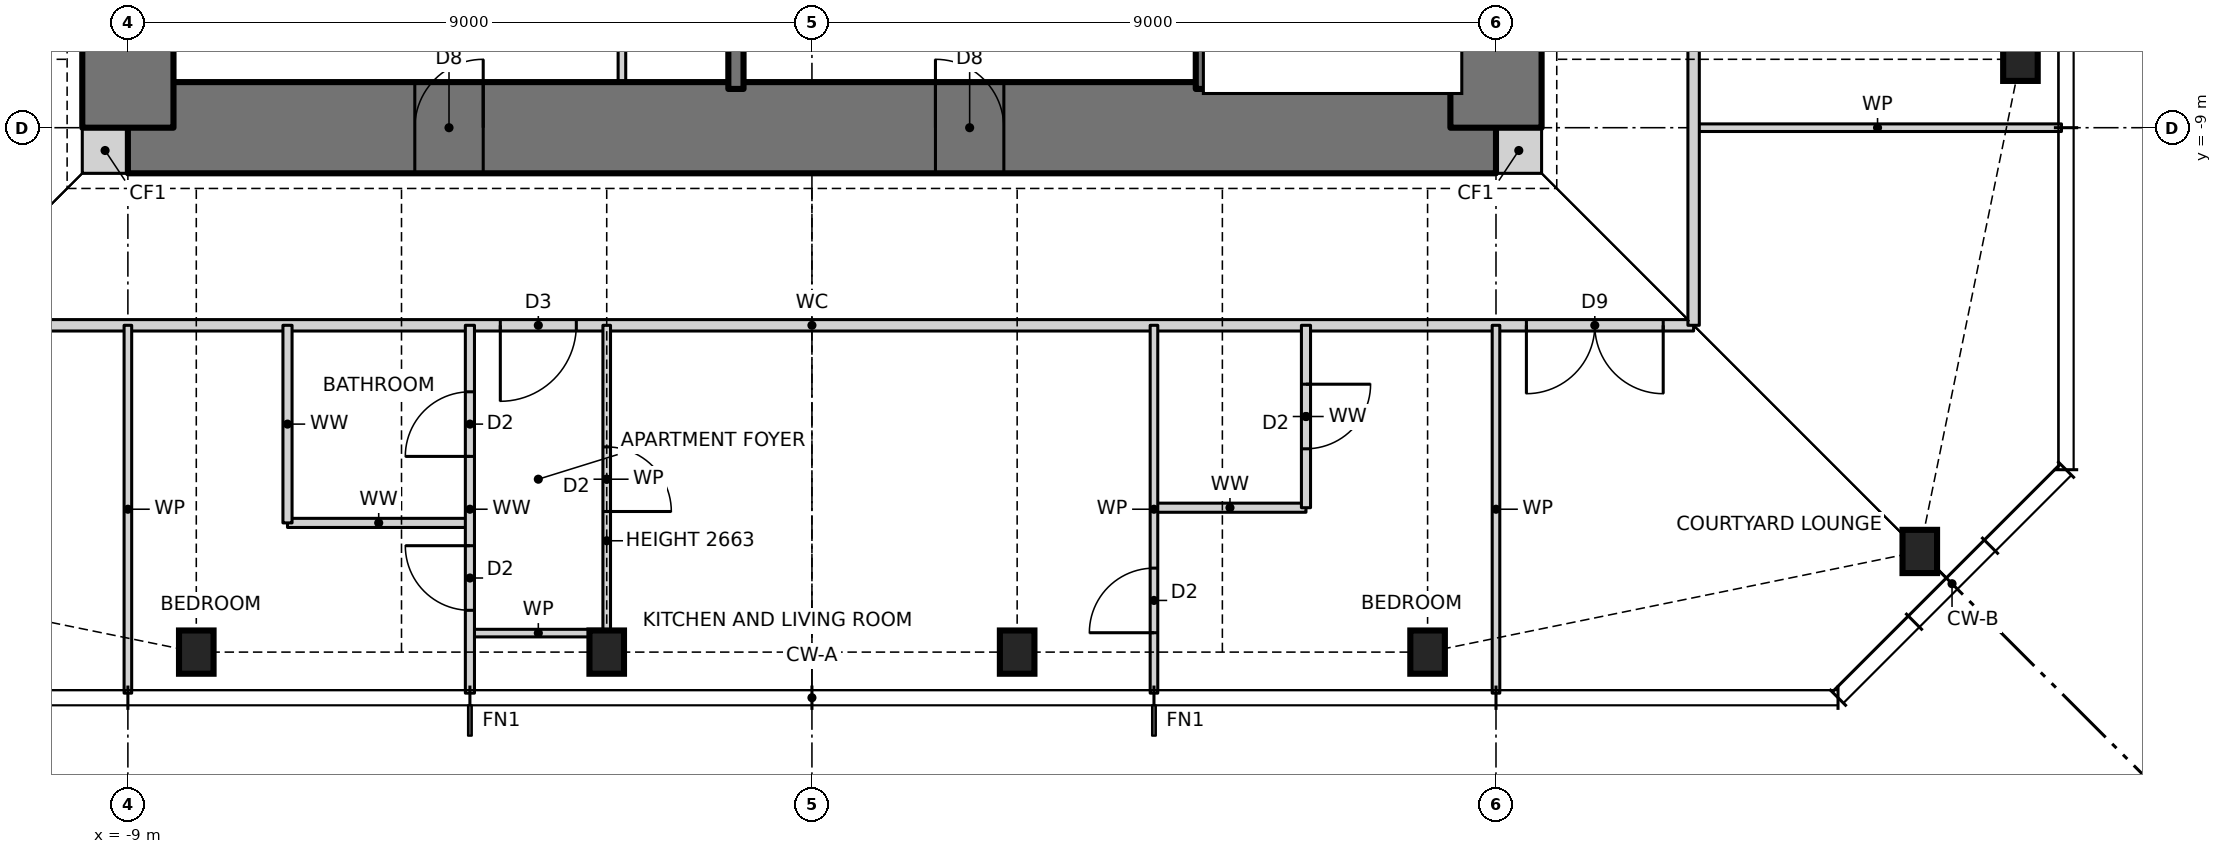
"""IFC4 building model, lengths in metres.
Left out: names, types, materials, properties, quantities, classifications, styles, units other than length and angle.
Written with IfcOpenShell. Run it as: python <this file> out.ifc"""

import sys

from ifc_helpers import new_model, si_unit, direction, frame, frame_2d, origin, origin_2d, place, context, subcontext, project, spatial, rectangle, i_section, extrude, element, fill, save


model = new_model("IFC4")
c1 = context("Model", 3, precision=1e-05, world=origin(), true_north=direction((0.0, 1.0)))
c2 = subcontext(c1, "Body", "Model", "MODEL_VIEW")
j1 = project(units=[si_unit("LENGTHUNIT", "METRE"), si_unit("PLANEANGLEUNIT", "RADIAN")], contexts=[c1])
p1 = place(None, origin())
s1 = spatial("IfcSite", under=j1, at=p1, CompositionType="ELEMENT")
p2 = place(p1, origin())
s2 = spatial("IfcBuilding", under=s1, at=p2, CompositionType="ELEMENT")
p3 = place(p2, frame((0.0, 0.0, 243.0)))
s3 = spatial("IfcBuildingStorey", under=s2, at=p3, CompositionType="ELEMENT", Elevation=243.0)
for number, where, z_axis, x_axis in (
    (1, (-8.1, -15.9, 0.0), (0.0, 0.0, 1.0), (1.0, 0.0, 0.0)),
    (2, (-2.7, -15.9, 0.0), (0.0, 0.0, 1.0), (1.0, 0.0, 0.0)),
    (3, (2.7, -15.9, 0.0), (0.0, 0.0, 1.0), (1.0, 0.0, 0.0)),
    (4, (8.1, -15.9, 0.0), (0.0, 0.0, 1.0), (1.0, 0.0, 0.0)),
    (5, (14.576, -14.576, 0.0), (0.0, 0.0, 1.0), (1.0, 0.0, 0.0)),
    (6, (15.9, -8.1, 0.0), (0.0, 0.0, 1.0), (1.0, 0.0, 0.0)),
):
    element("IfcColumn", number, at=place(p3, frame(where, z_axis=z_axis, x_axis=x_axis)), inside=s3, PredefinedType="COLUMN", context=c2, shape_type="SweptSolid", body=[
        extrude(i_section(OverallWidth=0.455, OverallDepth=0.569, WebThickness=0.078, FlangeThickness=0.125, at=origin_2d()), origin(), (0.0, 0.0, 1.0), 3.5),
    ])
for number, where, z_axis, x_axis in (
    (7, (-9.6, -9.3, 0.0), (0.0, 0.0, 1.0), (1.0, 0.0, 0.0)),
    (8, (9.0, -9.3, 0.0), (0.0, 0.0, 1.0), (1.0, 0.0, 0.0)),
):
    element("IfcWall", number, at=place(p3, frame(where, z_axis=z_axis, x_axis=x_axis)), inside=s3, PredefinedType="SOLIDWALL", context=c2, shape_type="SweptSolid", body=[
        extrude(rectangle(XDim=0.6, YDim=0.6, at=frame_2d((0.3, 0.0))), origin(), (0.0, 0.0, 1.0), 3.5),
    ])
p4 = place(p3, frame((-9.0, -9.0, 0.0), z_axis=(0.0, 0.0, 1.0), x_axis=(1.0, 0.0, 0.0)))
e9 = element("IfcWall", 9, at=p4, inside=s3, PredefinedType="SHEAR", context=c2, shape_type="SweptSolid", body=[
    extrude(rectangle(XDim=18.0, YDim=1.2, at=frame_2d((9.0, 0.0))), origin(), (0.0, 0.0, 1.0), 3.5),
])
p5 = place(p4, frame((3.775, 0.0, 0.0)))
e10 = element("IfcOpeningElement", 10, at=p5, cuts=e9, PredefinedType="OPENING", context=c2, shape_type="SweptSolid", body=[
    extrude(rectangle(XDim=0.9, YDim=2.1, at=frame_2d((0.45, 1.05))), frame((0.0, 0.61, 0.0), z_axis=(0.0, -1.0, 0.0), x_axis=(1.0, 0.0, 0.0)), (0.0, 0.0, 1.0), 1.22),
])
p6 = place(p4, frame((10.625, 0.0, 0.0)))
e11 = element("IfcOpeningElement", 11, at=p6, cuts=e9, PredefinedType="OPENING", context=c2, shape_type="SweptSolid", body=[
    extrude(rectangle(XDim=0.9, YDim=2.1, at=frame_2d((0.45, 1.05))), frame((0.0, 0.61, 0.0), z_axis=(0.0, -1.0, 0.0), x_axis=(1.0, 0.0, 0.0)), (0.0, 0.0, 1.0), 1.22),
])
p7 = place(p3, frame((9.0, -9.0, 0.0), z_axis=(0.0, 0.0, 1.0), x_axis=(0.0, 1.0, 0.0)))
e12 = element("IfcWall", 12, at=p7, inside=s3, PredefinedType="SHEAR", context=c2, shape_type="SweptSolid", body=[
    extrude(rectangle(XDim=18.0, YDim=1.2, at=frame_2d((9.0, 0.0))), origin(), (0.0, 0.0, 1.0), 3.5),
])
p8 = place(p7, frame((8.5, 0.0, 0.0)))
e13 = element("IfcOpeningElement", 13, at=p8, cuts=e12, PredefinedType="OPENING", context=c2, shape_type="SweptSolid", body=[
    extrude(rectangle(XDim=1.0, YDim=2.1, at=frame_2d((0.5, 1.05))), frame((0.0, 0.61, 0.0), z_axis=(0.0, -1.0, 0.0), x_axis=(1.0, 0.0, 0.0)), (0.0, 0.0, 1.0), 1.22),
])
p9 = place(p3, frame((-9.0, 9.0, 0.0), z_axis=(0.0, 0.0, 1.0), x_axis=(0.0, -1.0, 0.0)))
e14 = element("IfcWall", 14, at=p9, inside=s3, PredefinedType="SHEAR", context=c2, shape_type="SweptSolid", body=[
    extrude(rectangle(XDim=18.0, YDim=1.2, at=frame_2d((9.0, 0.0))), origin(), (0.0, 0.0, 1.0), 3.5),
])
p10 = place(p9, frame((8.5, 0.0, 0.0)))
e15 = element("IfcOpeningElement", 15, at=p10, cuts=e14, PredefinedType="OPENING", context=c2, shape_type="SweptSolid", body=[
    extrude(rectangle(XDim=1.0, YDim=2.1, at=frame_2d((0.5, 1.05))), frame((0.0, 0.61, 0.0), z_axis=(0.0, -1.0, 0.0), x_axis=(1.0, 0.0, 0.0)), (0.0, 0.0, 1.0), 1.22),
])
p11 = place(p3, frame((-4.5, -15.65, 0.0), z_axis=(0.0, 0.0, 1.0), x_axis=(1.0, 0.0, 0.0)))
e16 = element("IfcWall", 16, at=p11, inside=s3, PredefinedType="PARTITIONING", context=c2, shape_type="SweptSolid", body=[
    extrude(rectangle(XDim=1.8, YDim=0.1, at=frame_2d((0.9, 0.0))), origin(), (0.0, 0.0, 1.0), 3.27),
])
p12 = place(p3, frame((-6.9, -14.2, 0.0), z_axis=(0.0, 0.0, 1.0), x_axis=(1.0, 0.0, 0.0)))
e17 = element("IfcWall", 17, at=p12, inside=s3, PredefinedType="PARTITIONING", context=c2, shape_type="SweptSolid", body=[
    extrude(rectangle(XDim=2.4, YDim=0.12, at=frame_2d((1.2, 0.0))), origin(), (0.0, 0.0, 1.0), 3.27),
])
p13 = place(p3, frame((4.5, -14.0, 0.0), z_axis=(0.0, 0.0, 1.0), x_axis=(1.0, 0.0, 0.0)))
e18 = element("IfcWall", 18, at=p13, inside=s3, PredefinedType="PARTITIONING", context=c2, shape_type="SweptSolid", body=[
    extrude(rectangle(XDim=2.0, YDim=0.12, at=frame_2d((1.0, 0.0))), origin(), (0.0, 0.0, 1.0), 3.27),
])
p14 = place(p3, frame((-11.6, -11.6, 0.0), z_axis=(0.0, 0.0, 1.0), x_axis=(1.0, 0.0, 0.0)))
e19 = element("IfcWall", 19, at=p14, inside=s3, PredefinedType="PARTITIONING", context=c2, shape_type="SweptSolid", body=[
    extrude(rectangle(XDim=23.2, YDim=0.15, at=frame_2d((11.6, 0.0))), origin(), (0.0, 0.0, 1.0), 3.27),
])
p15 = place(p14, frame((7.5, 0.0, 0.0)))
e20 = element("IfcOpeningElement", 20, at=p15, cuts=e19, PredefinedType="OPENING", context=c2, shape_type="SweptSolid", body=[
    extrude(rectangle(XDim=1.0, YDim=2.1, at=frame_2d((0.5, 1.05))), frame((0.0, 0.085, 0.0), z_axis=(0.0, -1.0, 0.0), x_axis=(1.0, 0.0, 0.0)), (0.0, 0.0, 1.0), 0.17),
])
p16 = place(p14, frame((21.0, 0.0, 0.0)))
e21 = element("IfcOpeningElement", 21, at=p16, cuts=e19, PredefinedType="OPENING", context=c2, shape_type="SweptSolid", body=[
    extrude(rectangle(XDim=1.8, YDim=2.1, at=frame_2d((0.9, 1.05))), frame((0.0, 0.085, 0.0), z_axis=(0.0, -1.0, 0.0), x_axis=(1.0, 0.0, 0.0)), (0.0, 0.0, 1.0), 0.17),
])
p17 = place(p3, frame((11.6, -9.0, 0.0), z_axis=(0.0, 0.0, 1.0), x_axis=(1.0, 0.0, 0.0)))
e22 = element("IfcWall", 22, at=p17, inside=s3, PredefinedType="PARTITIONING", context=c2, shape_type="SweptSolid", body=[
    extrude(rectangle(XDim=4.84, YDim=0.1, at=frame_2d((2.42, 0.0))), origin(), (0.0, 0.0, 1.0), 3.27),
])
p18 = place(p3, frame((11.6, -11.6, 0.0), z_axis=(0.0, 0.0, 1.0), x_axis=(0.0, 1.0, 0.0)))
e23 = element("IfcWall", 23, at=p18, inside=s3, PredefinedType="PARTITIONING", context=c2, shape_type="SweptSolid", body=[
    extrude(rectangle(XDim=23.2, YDim=0.15, at=frame_2d((11.6, 0.0))), origin(), (0.0, 0.0, 1.0), 3.27),
])
p19 = place(p18, frame((7.5, 0.0, 0.0)))
e24 = element("IfcOpeningElement", 24, at=p19, cuts=e23, PredefinedType="OPENING", context=c2, shape_type="SweptSolid", body=[
    extrude(rectangle(XDim=1.0, YDim=2.1, at=frame_2d((0.5, 1.05))), frame((0.0, 0.085, 0.0), z_axis=(0.0, -1.0, 0.0), x_axis=(1.0, 0.0, 0.0)), (0.0, 0.0, 1.0), 0.17),
])
p20 = place(p18, frame((21.0, 0.0, 0.0)))
e25 = element("IfcOpeningElement", 25, at=p20, cuts=e23, PredefinedType="OPENING", context=c2, shape_type="SweptSolid", body=[
    extrude(rectangle(XDim=1.8, YDim=2.1, at=frame_2d((0.9, 1.05))), frame((0.0, 0.085, 0.0), z_axis=(0.0, -1.0, 0.0), x_axis=(1.0, 0.0, 0.0)), (0.0, 0.0, 1.0), 0.17),
])
p21 = place(p3, frame((9.0, -16.44, 0.0), z_axis=(0.0, 0.0, 1.0), x_axis=(0.0, 1.0, 0.0)))
e26 = element("IfcWall", 26, at=p21, inside=s3, PredefinedType="PARTITIONING", context=c2, shape_type="SweptSolid", body=[
    extrude(rectangle(XDim=4.84, YDim=0.1, at=frame_2d((2.42, 0.0))), origin(), (0.0, 0.0, 1.0), 3.27),
])
p22 = place(p3, frame((6.5, -14.0, 0.0), z_axis=(0.0, 0.0, 1.0), x_axis=(0.0, 1.0, 0.0)))
e27 = element("IfcWall", 27, at=p22, inside=s3, PredefinedType="PARTITIONING", context=c2, shape_type="SweptSolid", body=[
    extrude(rectangle(XDim=2.4, YDim=0.12, at=frame_2d((1.2, 0.0))), origin(), (0.0, 0.0, 1.0), 3.27),
])
p23 = place(p22, frame((0.775, 0.0, 0.0)))
e28 = element("IfcOpeningElement", 28, at=p23, cuts=e27, PredefinedType="OPENING", context=c2, shape_type="SweptSolid", body=[
    extrude(rectangle(XDim=0.85, YDim=2.1, at=frame_2d((0.425, 1.05))), frame((0.0, 0.07, 0.0), z_axis=(0.0, -1.0, 0.0), x_axis=(1.0, 0.0, 0.0)), (0.0, 0.0, 1.0), 0.14),
])
p24 = place(p3, frame((5.15, -8.49, 0.0), z_axis=(0.0, 0.0, 1.0), x_axis=(0.0, 1.0, 0.0)))
e29 = element("IfcWall", 29, at=p24, inside=s3, PredefinedType="SOLIDWALL", context=c2, shape_type="SweptSolid", body=[
    extrude(rectangle(XDim=13.09, YDim=0.2, at=frame_2d((6.545, 0.0))), origin(), (0.0, 0.0, 1.0), 3.5),
])
p25 = place(p24, frame((7.89, 0.0, 0.0)))
e30 = element("IfcOpeningElement", 30, at=p25, cuts=e29, PredefinedType="OPENING", context=c2, shape_type="SweptSolid", body=[
    extrude(rectangle(XDim=1.2, YDim=2.1, at=frame_2d((0.6, 1.05))), frame((0.0, 0.11, 0.0), z_axis=(0.0, -1.0, 0.0), x_axis=(1.0, 0.0, 0.0)), (0.0, 0.0, 1.0), 0.22),
])
p26 = place(p3, frame((4.5, -16.44, 0.0), z_axis=(0.0, 0.0, 1.0), x_axis=(0.0, 1.0, 0.0)))
e31 = element("IfcWall", 31, at=p26, inside=s3, PredefinedType="PARTITIONING", context=c2, shape_type="SweptSolid", body=[
    extrude(rectangle(XDim=4.84, YDim=0.1, at=frame_2d((2.42, 0.0))), origin(), (0.0, 0.0, 1.0), 3.27),
])
p27 = place(p26, frame((0.795, 0.0, 0.0)))
e32 = element("IfcOpeningElement", 32, at=p27, cuts=e31, PredefinedType="OPENING", context=c2, shape_type="SweptSolid", body=[
    extrude(rectangle(XDim=0.85, YDim=2.1, at=frame_2d((0.425, 1.05))), frame((0.0, 0.06, 0.0), z_axis=(0.0, -1.0, 0.0), x_axis=(1.0, 0.0, 0.0)), (0.0, 0.0, 1.0), 0.12),
])
p28 = place(p3, frame((-1.0, -8.49, 0.0), z_axis=(0.0, 0.0, 1.0), x_axis=(0.0, 1.0, 0.0)))
e33 = element("IfcWall", 33, at=p28, inside=s3, PredefinedType="SOLIDWALL", context=c2, shape_type="SweptSolid", body=[
    extrude(rectangle(XDim=4.09, YDim=0.2, at=frame_2d((2.045, 0.0))), origin(), (0.0, 0.0, 1.0), 3.5),
])
p29 = place(p3, frame((-2.5, -8.49, 0.0), z_axis=(0.0, 0.0, 1.0), x_axis=(0.0, 1.0, 0.0)))
e34 = element("IfcWall", 34, at=p29, inside=s3, PredefinedType="PARTITIONING", context=c2, shape_type="SweptSolid", body=[
    extrude(rectangle(XDim=4.09, YDim=0.1, at=frame_2d((2.045, 0.0))), origin(), (0.0, 0.0, 1.0), 3.3),
])
p30 = place(p29, frame((1.595, 0.0, 0.0)))
e35 = element("IfcOpeningElement", 35, at=p30, cuts=e34, PredefinedType="OPENING", context=c2, shape_type="SweptSolid", body=[
    extrude(rectangle(XDim=0.9, YDim=2.1, at=frame_2d((0.45, 1.05))), frame((0.0, 0.06, 0.0), z_axis=(0.0, -1.0, 0.0), x_axis=(1.0, 0.0, 0.0)), (0.0, 0.0, 1.0), 0.12),
])
p31 = place(p3, frame((-2.7, -15.65, 0.0), z_axis=(0.0, 0.0, 1.0), x_axis=(0.0, 1.0, 0.0)))
e36 = element("IfcWall", 36, at=p31, inside=s3, PredefinedType="PARTITIONING", context=c2, shape_type="SweptSolid", body=[
    extrude(rectangle(XDim=4.05, YDim=0.1, at=frame_2d((2.025, 0.0))), origin(), (0.0, 0.0, 1.0), 2.663),
])
p32 = place(p31, frame((1.6, 0.0, 0.0)))
e37 = element("IfcOpeningElement", 37, at=p32, cuts=e36, PredefinedType="OPENING", context=c2, shape_type="SweptSolid", body=[
    extrude(rectangle(XDim=0.85, YDim=2.1, at=frame_2d((0.425, 1.05))), frame((0.0, 0.06, 0.0), z_axis=(0.0, -1.0, 0.0), x_axis=(1.0, 0.0, 0.0)), (0.0, 0.0, 1.0), 0.12),
])
p33 = place(p3, frame((-4.5, -16.44, 0.0), z_axis=(0.0, 0.0, 1.0), x_axis=(0.0, 1.0, 0.0)))
e38 = element("IfcWall", 38, at=p33, inside=s3, PredefinedType="PARTITIONING", context=c2, shape_type="SweptSolid", body=[
    extrude(rectangle(XDim=4.84, YDim=0.12, at=frame_2d((2.42, 0.0))), origin(), (0.0, 0.0, 1.0), 3.27),
])
p34 = place(p33, frame((1.09, 0.0, 0.0)))
e39 = element("IfcOpeningElement", 39, at=p34, cuts=e38, PredefinedType="OPENING", context=c2, shape_type="SweptSolid", body=[
    extrude(rectangle(XDim=0.85, YDim=2.1, at=frame_2d((0.425, 1.05))), frame((0.0, 0.07, 0.0), z_axis=(0.0, -1.0, 0.0), x_axis=(1.0, 0.0, 0.0)), (0.0, 0.0, 1.0), 0.14),
])
p35 = place(p33, frame((3.115, 0.0, 0.0)))
e40 = element("IfcOpeningElement", 40, at=p35, cuts=e38, PredefinedType="OPENING", context=c2, shape_type="SweptSolid", body=[
    extrude(rectangle(XDim=0.85, YDim=2.1, at=frame_2d((0.425, 1.05))), frame((0.0, 0.07, 0.0), z_axis=(0.0, -1.0, 0.0), x_axis=(1.0, 0.0, 0.0)), (0.0, 0.0, 1.0), 0.14),
])
p36 = place(p3, frame((-6.9, -14.2, 0.0), z_axis=(0.0, 0.0, 1.0), x_axis=(0.0, 1.0, 0.0)))
e41 = element("IfcWall", 41, at=p36, inside=s3, PredefinedType="PARTITIONING", context=c2, shape_type="SweptSolid", body=[
    extrude(rectangle(XDim=2.6, YDim=0.12, at=frame_2d((1.3, 0.0))), origin(), (0.0, 0.0, 1.0), 3.27),
])
p37 = place(p3, frame((-9.0, -16.44, 0.0), z_axis=(0.0, 0.0, 1.0), x_axis=(0.0, 1.0, 0.0)))
e42 = element("IfcWall", 42, at=p37, inside=s3, PredefinedType="PARTITIONING", context=c2, shape_type="SweptSolid", body=[
    extrude(rectangle(XDim=4.84, YDim=0.1, at=frame_2d((2.42, 0.0))), origin(), (0.0, 0.0, 1.0), 3.27),
])
p38 = place(p15, frame((1.0, 0.0, 0.0), z_axis=(0.0, 0.0, 1.0), x_axis=(-1.0, 0.0, 0.0)))
e43 = element("IfcDoor", 43, at=p38, inside=s3, OperationType="SINGLE_SWING_RIGHT", PredefinedType="DOOR", context=c2, shape_type="SweptSolid", body=[
    extrude(rectangle(XDim=1.0, YDim=2.1, at=frame_2d((0.5, 1.05))), frame((0.0, 0.025, 0.0), z_axis=(0.0, -1.0, 0.0), x_axis=(1.0, 0.0, 0.0)), (0.0, 0.0, 1.0), 0.05),
])
fill(e20, e43)
p39 = place(p32, frame((0.85, 0.0, 0.0), z_axis=(0.0, 0.0, 1.0), x_axis=(-1.0, 0.0, 0.0)))
e44 = element("IfcDoor", 44, at=p39, inside=s3, OperationType="SINGLE_SWING_RIGHT", PredefinedType="DOOR", context=c2, shape_type="SweptSolid", body=[
    extrude(rectangle(XDim=0.85, YDim=2.1, at=frame_2d((0.425, 1.05))), frame((0.0, 0.025, 0.0), z_axis=(0.0, -1.0, 0.0), x_axis=(1.0, 0.0, 0.0)), (0.0, 0.0, 1.0), 0.05),
])
fill(e37, e44)
p40 = place(p34, origin())
e45 = element("IfcDoor", 45, at=p40, inside=s3, OperationType="SINGLE_SWING_RIGHT", PredefinedType="DOOR", context=c2, shape_type="SweptSolid", body=[
    extrude(rectangle(XDim=0.85, YDim=2.1, at=frame_2d((0.425, 1.05))), frame((0.0, 0.025, 0.0), z_axis=(0.0, -1.0, 0.0), x_axis=(1.0, 0.0, 0.0)), (0.0, 0.0, 1.0), 0.05),
])
fill(e39, e45)
p41 = place(p35, origin())
e46 = element("IfcDoor", 46, at=p41, inside=s3, OperationType="SINGLE_SWING_LEFT", PredefinedType="DOOR", context=c2, shape_type="SweptSolid", body=[
    extrude(rectangle(XDim=0.85, YDim=2.1, at=frame_2d((0.425, 1.05))), frame((0.0, 0.025, 0.0), z_axis=(0.0, -1.0, 0.0), x_axis=(1.0, 0.0, 0.0)), (0.0, 0.0, 1.0), 0.05),
])
fill(e40, e46)
p42 = place(p27, origin())
e47 = element("IfcDoor", 47, at=p42, inside=s3, OperationType="SINGLE_SWING_LEFT", PredefinedType="DOOR", context=c2, shape_type="SweptSolid", body=[
    extrude(rectangle(XDim=0.85, YDim=2.1, at=frame_2d((0.425, 1.05))), frame((0.0, 0.025, 0.0), z_axis=(0.0, -1.0, 0.0), x_axis=(1.0, 0.0, 0.0)), (0.0, 0.0, 1.0), 0.05),
])
fill(e32, e47)
p43 = place(p23, frame((0.85, 0.0, 0.0), z_axis=(0.0, 0.0, 1.0), x_axis=(-1.0, 0.0, 0.0)))
e48 = element("IfcDoor", 48, at=p43, inside=s3, OperationType="SINGLE_SWING_LEFT", PredefinedType="DOOR", context=c2, shape_type="SweptSolid", body=[
    extrude(rectangle(XDim=0.85, YDim=2.1, at=frame_2d((0.425, 1.05))), frame((0.0, 0.025, 0.0), z_axis=(0.0, -1.0, 0.0), x_axis=(1.0, 0.0, 0.0)), (0.0, 0.0, 1.0), 0.05),
])
fill(e28, e48)
p44 = place(p16, frame((1.8, 0.0, 0.0), z_axis=(0.0, 0.0, 1.0), x_axis=(-1.0, 0.0, 0.0)))
e49 = element("IfcDoor", 49, at=p44, inside=s3, OperationType="DOUBLE_DOOR_SINGLE_SWING", PredefinedType="DOOR", context=c2, shape_type="SweptSolid", body=[
    extrude(rectangle(XDim=1.8, YDim=2.1, at=frame_2d((0.9, 1.05))), frame((0.0, 0.025, 0.0), z_axis=(0.0, -1.0, 0.0), x_axis=(1.0, 0.0, 0.0)), (0.0, 0.0, 1.0), 0.05),
])
fill(e21, e49)
p45 = place(p5, origin())
e50 = element("IfcDoor", 50, at=p45, inside=s3, OperationType="SINGLE_SWING_RIGHT", PredefinedType="DOOR", context=c2, shape_type="SweptSolid", body=[
    extrude(rectangle(XDim=0.9, YDim=2.1, at=frame_2d((0.45, 1.05))), frame((0.0, 0.025, 0.0), z_axis=(0.0, -1.0, 0.0), x_axis=(1.0, 0.0, 0.0)), (0.0, 0.0, 1.0), 0.05),
])
fill(e10, e50)
p46 = place(p6, origin())
e51 = element("IfcDoor", 51, at=p46, inside=s3, OperationType="SINGLE_SWING_LEFT", PredefinedType="DOOR", context=c2, shape_type="SweptSolid", body=[
    extrude(rectangle(XDim=0.9, YDim=2.1, at=frame_2d((0.45, 1.05))), frame((0.0, 0.025, 0.0), z_axis=(0.0, -1.0, 0.0), x_axis=(1.0, 0.0, 0.0)), (0.0, 0.0, 1.0), 0.05),
])
fill(e11, e51)
save(model, sys.argv[1])
